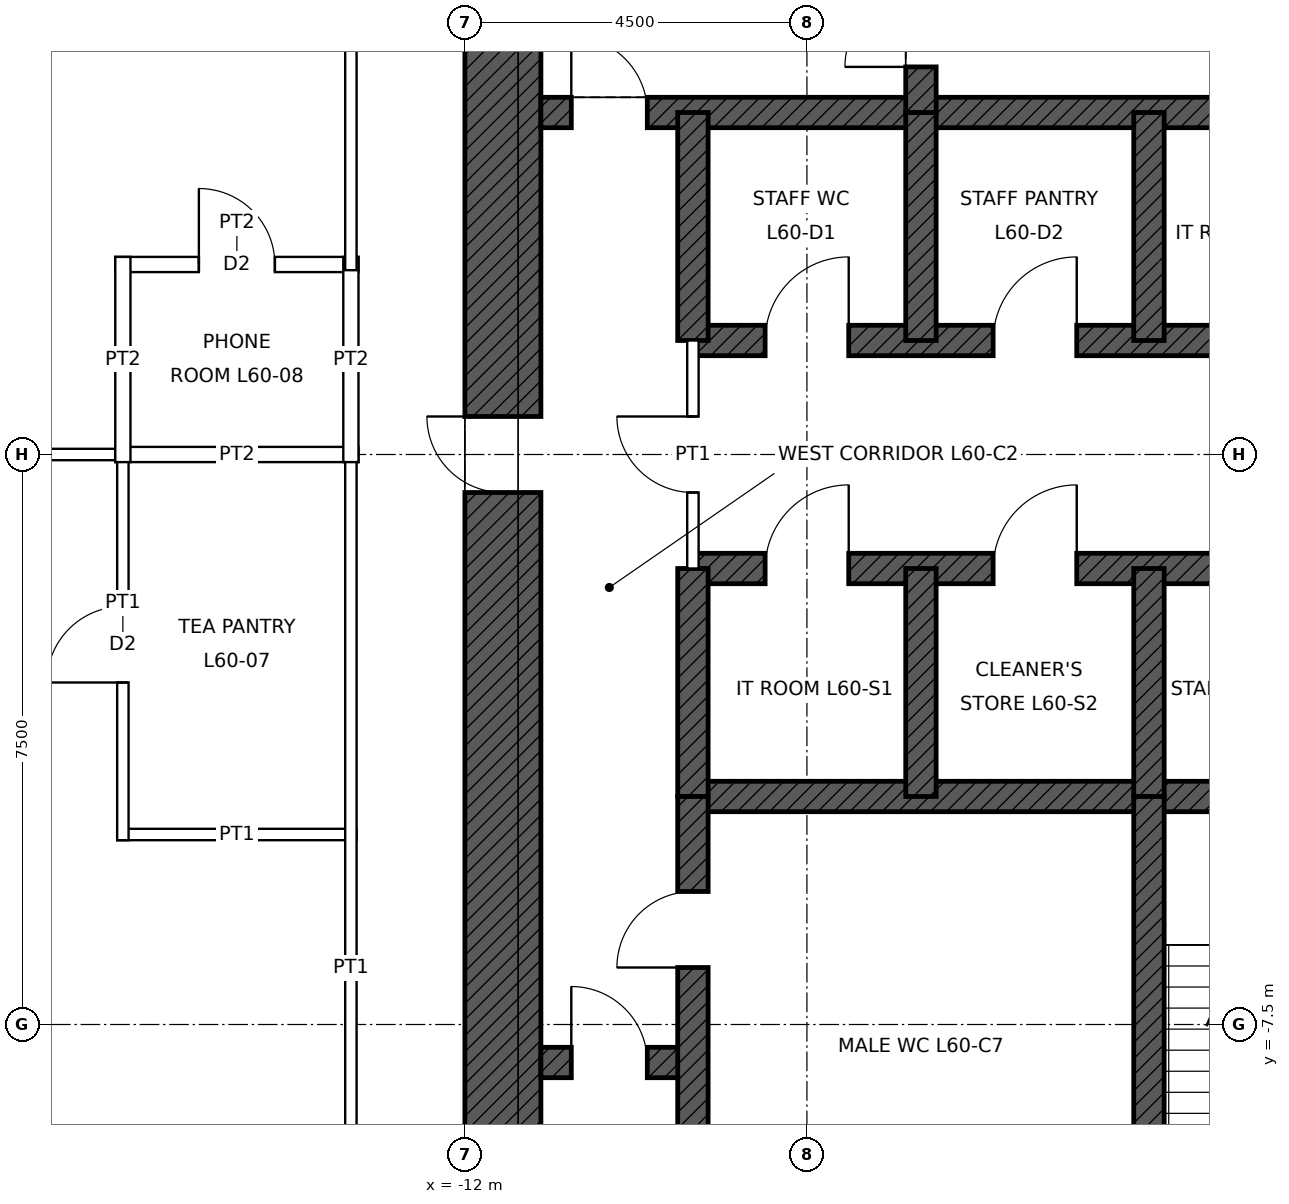
"""IFC4 building model, lengths in metres.
Left out: names, types, materials, properties, quantities, classifications, styles, units other than length and angle.
Written with IfcOpenShell. Run it as: python <this file> out.ifc"""

import sys

from ifc_helpers import new_model, si_unit, direction, frame, frame_2d, origin, place, context, subcontext, project, spatial, rectangle, extrude, element, fill, save


model = new_model("IFC4")
c1 = context("Model", 3, precision=1e-05, world=origin(), true_north=direction((0.0, 1.0)))
c2 = subcontext(c1, "Body", "Model", "MODEL_VIEW")
j1 = project(units=[si_unit("LENGTHUNIT", "METRE"), si_unit("PLANEANGLEUNIT", "RADIAN")], contexts=[c1])
p1 = place(None, origin())
s1 = spatial("IfcSite", under=j1, at=p1, CompositionType="ELEMENT")
p2 = place(p1, origin())
s2 = spatial("IfcBuilding", under=s1, at=p2, CompositionType="ELEMENT")
p3 = place(p2, frame((0.0, 0.0, 275.9)))
s3 = spatial("IfcBuildingStorey", under=s2, at=p3, CompositionType="ELEMENT", Elevation=275.9)
p4 = place(p3, frame((-11.5, -11.0, 0.0), z_axis=(0.0, 0.0, 1.0), x_axis=(0.0, 1.0, 0.0)))
e1 = element("IfcWall", 1, at=p4, inside=s3, PredefinedType="SHEAR", context=c2, shape_type="SweptSolid", body=[
    extrude(rectangle(XDim=22.0, YDim=1.0, at=frame_2d((11.0, 0.0))), origin(), (0.0, 0.0, 1.0), 4.0),
])
p5 = place(p4, frame((10.5, 0.0, 0.0)))
e2 = element("IfcOpeningElement", 2, at=p5, cuts=e1, PredefinedType="OPENING", context=c2, shape_type="SweptSolid", body=[
    extrude(rectangle(XDim=1.0, YDim=2.4, at=frame_2d((0.5, 1.2))), frame((0.0, 0.51, 0.0), z_axis=(0.0, -1.0, 0.0), x_axis=(1.0, 0.0, 0.0)), (0.0, 0.0, 1.0), 1.02),
])
p6 = place(p3, frame((-11.0, 4.5, 0.0), z_axis=(0.0, 0.0, 1.0), x_axis=(1.0, 0.0, 0.0)))
e3 = element("IfcWall", 3, at=p6, inside=s3, PredefinedType="SHEAR", context=c2, shape_type="SweptSolid", body=[
    extrude(rectangle(XDim=22.0, YDim=0.4, at=frame_2d((11.0, 0.0))), origin(), (0.0, 0.0, 1.0), 4.0),
])
p7 = place(p6, frame((0.4, 0.0, 0.0)))
e4 = element("IfcOpeningElement", 4, at=p7, cuts=e3, PredefinedType="OPENING", context=c2, shape_type="SweptSolid", body=[
    extrude(rectangle(XDim=1.0, YDim=2.1, at=frame_2d((0.5, 1.05))), frame((0.0, 0.21, 0.0), z_axis=(0.0, -1.0, 0.0), x_axis=(1.0, 0.0, 0.0)), (0.0, 0.0, 1.0), 0.42),
])
p8 = place(p6, frame((20.6, 0.0, 0.0)))
e5 = element("IfcOpeningElement", 5, at=p8, cuts=e3, PredefinedType="OPENING", context=c2, shape_type="SweptSolid", body=[
    extrude(rectangle(XDim=1.0, YDim=2.1, at=frame_2d((0.5, 1.05))), frame((0.0, 0.21, 0.0), z_axis=(0.0, -1.0, 0.0), x_axis=(1.0, 0.0, 0.0)), (0.0, 0.0, 1.0), 0.42),
])
p9 = place(p3, frame((-9.0, 1.5, 0.0), z_axis=(0.0, 0.0, 1.0), x_axis=(1.0, 0.0, 0.0)))
e6 = element("IfcWall", 6, at=p9, inside=s3, PredefinedType="SHEAR", context=c2, shape_type="SweptSolid", body=[
    extrude(rectangle(XDim=18.0, YDim=0.4, at=frame_2d((9.0, 0.0))), origin(), (0.0, 0.0, 1.0), 4.0),
])
p10 = place(p9, frame((0.95, 0.0, 0.0)))
e7 = element("IfcOpeningElement", 7, at=p10, cuts=e6, PredefinedType="OPENING", context=c2, shape_type="SweptSolid", body=[
    extrude(rectangle(XDim=1.1, YDim=2.1, at=frame_2d((0.55, 1.05))), frame((0.0, 0.21, 0.0), z_axis=(0.0, -1.0, 0.0), x_axis=(1.0, 0.0, 0.0)), (0.0, 0.0, 1.0), 0.42),
])
p11 = place(p9, frame((3.95, 0.0, 0.0)))
e8 = element("IfcOpeningElement", 8, at=p11, cuts=e6, PredefinedType="OPENING", context=c2, shape_type="SweptSolid", body=[
    extrude(rectangle(XDim=1.1, YDim=2.1, at=frame_2d((0.55, 1.05))), frame((0.0, 0.21, 0.0), z_axis=(0.0, -1.0, 0.0), x_axis=(1.0, 0.0, 0.0)), (0.0, 0.0, 1.0), 0.42),
])
p12 = place(p9, frame((6.95, 0.0, 0.0)))
e9 = element("IfcOpeningElement", 9, at=p12, cuts=e6, PredefinedType="OPENING", context=c2, shape_type="SweptSolid", body=[
    extrude(rectangle(XDim=1.1, YDim=2.1, at=frame_2d((0.55, 1.05))), frame((0.0, 0.21, 0.0), z_axis=(0.0, -1.0, 0.0), x_axis=(1.0, 0.0, 0.0)), (0.0, 0.0, 1.0), 0.42),
])
p13 = place(p9, frame((9.95, 0.0, 0.0)))
e10 = element("IfcOpeningElement", 10, at=p13, cuts=e6, PredefinedType="OPENING", context=c2, shape_type="SweptSolid", body=[
    extrude(rectangle(XDim=1.1, YDim=2.1, at=frame_2d((0.55, 1.05))), frame((0.0, 0.21, 0.0), z_axis=(0.0, -1.0, 0.0), x_axis=(1.0, 0.0, 0.0)), (0.0, 0.0, 1.0), 0.42),
])
p14 = place(p9, frame((12.95, 0.0, 0.0)))
e11 = element("IfcOpeningElement", 11, at=p14, cuts=e6, PredefinedType="OPENING", context=c2, shape_type="SweptSolid", body=[
    extrude(rectangle(XDim=1.1, YDim=2.1, at=frame_2d((0.55, 1.05))), frame((0.0, 0.21, 0.0), z_axis=(0.0, -1.0, 0.0), x_axis=(1.0, 0.0, 0.0)), (0.0, 0.0, 1.0), 0.42),
])
p15 = place(p9, frame((15.95, 0.0, 0.0)))
e12 = element("IfcOpeningElement", 12, at=p15, cuts=e6, PredefinedType="OPENING", context=c2, shape_type="SweptSolid", body=[
    extrude(rectangle(XDim=1.1, YDim=2.1, at=frame_2d((0.55, 1.05))), frame((0.0, 0.21, 0.0), z_axis=(0.0, -1.0, 0.0), x_axis=(1.0, 0.0, 0.0)), (0.0, 0.0, 1.0), 0.42),
])
p16 = place(p3, frame((-9.0, -1.5, 0.0), z_axis=(0.0, 0.0, 1.0), x_axis=(1.0, 0.0, 0.0)))
e13 = element("IfcWall", 13, at=p16, inside=s3, PredefinedType="SHEAR", context=c2, shape_type="SweptSolid", body=[
    extrude(rectangle(XDim=18.0, YDim=0.4, at=frame_2d((9.0, 0.0))), origin(), (0.0, 0.0, 1.0), 4.0),
])
p17 = place(p16, frame((9.95, 0.0, 0.0)))
e14 = element("IfcOpeningElement", 14, at=p17, cuts=e13, PredefinedType="OPENING", context=c2, shape_type="SweptSolid", body=[
    extrude(rectangle(XDim=1.1, YDim=2.1, at=frame_2d((0.55, 1.05))), frame((0.0, 0.21, 0.0), z_axis=(0.0, -1.0, 0.0), x_axis=(1.0, 0.0, 0.0)), (0.0, 0.0, 1.0), 0.42),
])
p18 = place(p16, frame((12.95, 0.0, 0.0)))
e15 = element("IfcOpeningElement", 15, at=p18, cuts=e13, PredefinedType="OPENING", context=c2, shape_type="SweptSolid", body=[
    extrude(rectangle(XDim=1.1, YDim=2.1, at=frame_2d((0.55, 1.05))), frame((0.0, 0.21, 0.0), z_axis=(0.0, -1.0, 0.0), x_axis=(1.0, 0.0, 0.0)), (0.0, 0.0, 1.0), 0.42),
])
p19 = place(p16, frame((15.95, 0.0, 0.0)))
e16 = element("IfcOpeningElement", 16, at=p19, cuts=e13, PredefinedType="OPENING", context=c2, shape_type="SweptSolid", body=[
    extrude(rectangle(XDim=1.1, YDim=2.1, at=frame_2d((0.55, 1.05))), frame((0.0, 0.21, 0.0), z_axis=(0.0, -1.0, 0.0), x_axis=(1.0, 0.0, 0.0)), (0.0, 0.0, 1.0), 0.42),
])
p20 = place(p16, frame((0.95, 0.0, 0.0)))
e17 = element("IfcOpeningElement", 17, at=p20, cuts=e13, PredefinedType="OPENING", context=c2, shape_type="SweptSolid", body=[
    extrude(rectangle(XDim=1.1, YDim=2.1, at=frame_2d((0.55, 1.05))), frame((0.0, 0.21, 0.0), z_axis=(0.0, -1.0, 0.0), x_axis=(1.0, 0.0, 0.0)), (0.0, 0.0, 1.0), 0.42),
])
p21 = place(p16, frame((3.95, 0.0, 0.0)))
e18 = element("IfcOpeningElement", 18, at=p21, cuts=e13, PredefinedType="OPENING", context=c2, shape_type="SweptSolid", body=[
    extrude(rectangle(XDim=1.1, YDim=2.1, at=frame_2d((0.55, 1.05))), frame((0.0, 0.21, 0.0), z_axis=(0.0, -1.0, 0.0), x_axis=(1.0, 0.0, 0.0)), (0.0, 0.0, 1.0), 0.42),
])
p22 = place(p16, frame((6.95, 0.0, 0.0)))
e19 = element("IfcOpeningElement", 19, at=p22, cuts=e13, PredefinedType="OPENING", context=c2, shape_type="SweptSolid", body=[
    extrude(rectangle(XDim=1.1, YDim=2.1, at=frame_2d((0.55, 1.05))), frame((0.0, 0.21, 0.0), z_axis=(0.0, -1.0, 0.0), x_axis=(1.0, 0.0, 0.0)), (0.0, 0.0, 1.0), 0.42),
])
p23 = place(p3, frame((-9.0, -4.5, 0.0), z_axis=(0.0, 0.0, 1.0), x_axis=(1.0, 0.0, 0.0)))
e20 = element("IfcWall", 20, at=p23, inside=s3, PredefinedType="SHEAR", context=c2, shape_type="SweptSolid", body=[
    extrude(rectangle(XDim=18.0, YDim=0.4, at=frame_2d((9.0, 0.0))), origin(), (0.0, 0.0, 1.0), 4.0),
])
p24 = place(p3, frame((-11.0, -8.0, 0.0), z_axis=(0.0, 0.0, 1.0), x_axis=(1.0, 0.0, 0.0)))
e21 = element("IfcWall", 21, at=p24, inside=s3, PredefinedType="SHEAR", context=c2, shape_type="SweptSolid", body=[
    extrude(rectangle(XDim=2.0, YDim=0.4, at=frame_2d((1.0, 0.0))), origin(), (0.0, 0.0, 1.0), 4.0),
])
p25 = place(p24, frame((0.4, 0.0, 0.0)))
e22 = element("IfcOpeningElement", 22, at=p25, cuts=e21, PredefinedType="OPENING", context=c2, shape_type="SweptSolid", body=[
    extrude(rectangle(XDim=1.0, YDim=2.1, at=frame_2d((0.5, 1.05))), frame((0.0, 0.21, 0.0), z_axis=(0.0, -1.0, 0.0), x_axis=(1.0, 0.0, 0.0)), (0.0, 0.0, 1.0), 0.42),
])
for number, where, z_axis, x_axis in (
    (23, (-9.0, 1.5, 0.0), (0.0, 0.0, 1.0), (0.0, 1.0, 0.0)),
    (24, (-9.0, -4.5, 0.0), (0.0, 0.0, 1.0), (0.0, 1.0, 0.0)),
    (25, (-6.0, 1.5, 0.0), (0.0, 0.0, 1.0), (0.0, 1.0, 0.0)),
    (26, (-3.0, 1.5, 0.0), (0.0, 0.0, 1.0), (0.0, 1.0, 0.0)),
    (27, (-6.0, -4.5, 0.0), (0.0, 0.0, 1.0), (0.0, 1.0, 0.0)),
    (28, (-3.0, -4.5, 0.0), (0.0, 0.0, 1.0), (0.0, 1.0, 0.0)),
):
    element("IfcWall", number, at=place(p3, frame(where, z_axis=z_axis, x_axis=x_axis)), inside=s3, PredefinedType="SHEAR", context=c2, shape_type="SweptSolid", body=[
        extrude(rectangle(XDim=3.0, YDim=0.4, at=frame_2d((1.5, 0.0))), origin(), (0.0, 0.0, 1.0), 4.0),
    ])
p26 = place(p3, frame((-6.0, 4.5, 0.0), z_axis=(0.0, 0.0, 1.0), x_axis=(0.0, 1.0, 0.0)))
e29 = element("IfcWall", 29, at=p26, inside=s3, PredefinedType="SHEAR", context=c2, shape_type="SweptSolid", body=[
    extrude(rectangle(XDim=6.5, YDim=0.4, at=frame_2d((3.25, 0.0))), origin(), (0.0, 0.0, 1.0), 4.0),
])
p27 = place(p26, frame((0.6, 0.0, 0.0)))
e30 = element("IfcOpeningElement", 30, at=p27, cuts=e29, PredefinedType="OPENING", context=c2, shape_type="SweptSolid", body=[
    extrude(rectangle(XDim=1.0, YDim=2.1, at=frame_2d((0.5, 1.05))), frame((0.0, 0.21, 0.0), z_axis=(0.0, -1.0, 0.0), x_axis=(1.0, 0.0, 0.0)), (0.0, 0.0, 1.0), 0.42),
])
p28 = place(p3, frame((-9.0, -11.0, 0.0), z_axis=(0.0, 0.0, 1.0), x_axis=(0.0, 1.0, 0.0)))
e31 = element("IfcWall", 31, at=p28, inside=s3, PredefinedType="SHEAR", context=c2, shape_type="SweptSolid", body=[
    extrude(rectangle(XDim=6.5, YDim=0.4, at=frame_2d((3.25, 0.0))), origin(), (0.0, 0.0, 1.0), 4.0),
])
p29 = place(p28, frame((4.25, 0.0, 0.0)))
e32 = element("IfcOpeningElement", 32, at=p29, cuts=e31, PredefinedType="OPENING", context=c2, shape_type="SweptSolid", body=[
    extrude(rectangle(XDim=1.0, YDim=2.1, at=frame_2d((0.5, 1.05))), frame((0.0, 0.21, 0.0), z_axis=(0.0, -1.0, 0.0), x_axis=(1.0, 0.0, 0.0)), (0.0, 0.0, 1.0), 0.42),
])
p30 = place(p3, frame((-3.0, -11.0, 0.0), z_axis=(0.0, 0.0, 1.0), x_axis=(0.0, 1.0, 0.0)))
e33 = element("IfcWall", 33, at=p30, inside=s3, PredefinedType="SHEAR", context=c2, shape_type="SweptSolid", body=[
    extrude(rectangle(XDim=6.5, YDim=0.4, at=frame_2d((3.25, 0.0))), origin(), (0.0, 0.0, 1.0), 4.0),
])
p31 = place(p3, frame((-16.575, -5.0, 0.0), z_axis=(0.0, 0.0, 1.0), x_axis=(1.0, 0.0, 0.0)))
e34 = element("IfcWall", 34, at=p31, inside=s3, PredefinedType="PARTITIONING", context=c2, shape_type="SweptSolid", body=[
    extrude(rectangle(XDim=3.15, YDim=0.15, at=frame_2d((1.575, 0.0))), origin(), (0.0, 0.0, 1.0), 3.85),
])
p32 = place(p3, frame((-19.54, 0.0, 0.0), z_axis=(0.0, 0.0, 1.0), x_axis=(1.0, 0.0, 0.0)))
e35 = element("IfcWall", 35, at=p32, inside=s3, PredefinedType="PARTITIONING", context=c2, shape_type="SweptSolid", body=[
    extrude(rectangle(XDim=3.115, YDim=0.15, at=frame_2d((1.558, 0.0))), origin(), (0.0, 0.0, 1.0), 3.243),
])
p33 = place(p3, frame((-16.6, 0.0, 0.0), z_axis=(0.0, 0.0, 1.0), x_axis=(1.0, 0.0, 0.0)))
e36 = element("IfcWall", 36, at=p33, inside=s3, PredefinedType="PARTITIONING", context=c2, shape_type="SweptSolid", body=[
    extrude(rectangle(XDim=3.2, YDim=0.2, at=frame_2d((1.6, 0.0))), origin(), (0.0, 0.0, 1.0), 3.243),
])
p34 = place(p3, frame((-16.6, 2.5, 0.0), z_axis=(0.0, 0.0, 1.0), x_axis=(1.0, 0.0, 0.0)))
e37 = element("IfcWall", 37, at=p34, inside=s3, PredefinedType="PARTITIONING", context=c2, shape_type="SweptSolid", body=[
    extrude(rectangle(XDim=3.2, YDim=0.2, at=frame_2d((1.6, 0.0))), origin(), (0.0, 0.0, 1.0), 3.85),
])
p35 = place(p34, frame((1.1, 0.0, 0.0)))
e38 = element("IfcOpeningElement", 38, at=p35, cuts=e37, PredefinedType="OPENING", context=c2, shape_type="SweptSolid", body=[
    extrude(rectangle(XDim=1.0, YDim=2.1, at=frame_2d((0.5, 1.05))), frame((0.0, 0.11, 0.0), z_axis=(0.0, -1.0, 0.0), x_axis=(1.0, 0.0, 0.0)), (0.0, 0.0, 1.0), 0.22),
])
p36 = place(p3, frame((-16.5, -5.075, 0.0), z_axis=(0.0, 0.0, 1.0), x_axis=(0.0, 1.0, 0.0)))
e39 = element("IfcWall", 39, at=p36, inside=s3, PredefinedType="PARTITIONING", context=c2, shape_type="SweptSolid", body=[
    extrude(rectangle(XDim=5.15, YDim=0.15, at=frame_2d((2.575, 0.0))), origin(), (0.0, 0.0, 1.0), 3.85),
])
p37 = place(p36, frame((2.075, 0.0, 0.0)))
e40 = element("IfcOpeningElement", 40, at=p37, cuts=e39, PredefinedType="OPENING", context=c2, shape_type="SweptSolid", body=[
    extrude(rectangle(XDim=1.0, YDim=2.1, at=frame_2d((0.5, 1.05))), frame((0.0, 0.085, 0.0), z_axis=(0.0, -1.0, 0.0), x_axis=(1.0, 0.0, 0.0)), (0.0, 0.0, 1.0), 0.17),
])
p38 = place(p3, frame((-16.5, -0.1, 0.0), z_axis=(0.0, 0.0, 1.0), x_axis=(0.0, 1.0, 0.0)))
e41 = element("IfcWall", 41, at=p38, inside=s3, PredefinedType="PARTITIONING", context=c2, shape_type="SweptSolid", body=[
    extrude(rectangle(XDim=2.7, YDim=0.2, at=frame_2d((1.35, 0.0))), origin(), (0.0, 0.0, 1.0), 3.85),
])
p39 = place(p3, frame((-13.5, -13.575, 0.0), z_axis=(0.0, 0.0, 1.0), x_axis=(0.0, 1.0, 0.0)))
e42 = element("IfcWall", 42, at=p39, inside=s3, PredefinedType="PARTITIONING", context=c2, shape_type="SweptSolid", body=[
    extrude(rectangle(XDim=13.65, YDim=0.15, at=frame_2d((6.825, 0.0))), origin(), (0.0, 0.0, 1.0), 3.85),
])
p40 = place(p3, frame((-13.5, -0.1, 0.0), z_axis=(0.0, 0.0, 1.0), x_axis=(0.0, 1.0, 0.0)))
e43 = element("IfcWall", 43, at=p40, inside=s3, PredefinedType="PARTITIONING", context=c2, shape_type="SweptSolid", body=[
    extrude(rectangle(XDim=2.7, YDim=0.2, at=frame_2d((1.35, 0.0))), origin(), (0.0, 0.0, 1.0), 3.85),
])
p41 = place(p3, frame((-13.5, 2.425, 0.0), z_axis=(0.0, 0.0, 1.0), x_axis=(0.0, 1.0, 0.0)))
e44 = element("IfcWall", 44, at=p41, inside=s3, PredefinedType="PARTITIONING", context=c2, shape_type="SweptSolid", body=[
    extrude(rectangle(XDim=11.15, YDim=0.15, at=frame_2d((5.575, 0.0))), origin(), (0.0, 0.0, 1.0), 3.85),
])
p42 = place(p41, frame((5.075, 0.0, 0.0)))
e45 = element("IfcOpeningElement", 45, at=p42, cuts=e44, PredefinedType="OPENING", context=c2, shape_type="SweptSolid", body=[
    extrude(rectangle(XDim=1.0, YDim=2.4, at=frame_2d((0.5, 1.2))), frame((0.0, 0.085, 0.0), z_axis=(0.0, -1.0, 0.0), x_axis=(1.0, 0.0, 0.0)), (0.0, 0.0, 1.0), 0.17),
])
p43 = place(p3, frame((-9.0, -1.5, 0.0), z_axis=(0.0, 0.0, 1.0), x_axis=(0.0, 1.0, 0.0)))
e46 = element("IfcWall", 46, at=p43, inside=s3, PredefinedType="PARTITIONING", context=c2, shape_type="SweptSolid", body=[
    extrude(rectangle(XDim=3.0, YDim=0.15, at=frame_2d((1.5, 0.0))), origin(), (0.0, 0.0, 1.0), 3.75),
])
p44 = place(p43, frame((1.0, 0.0, 0.0)))
e47 = element("IfcOpeningElement", 47, at=p44, cuts=e46, PredefinedType="OPENING", context=c2, shape_type="SweptSolid", body=[
    extrude(rectangle(XDim=1.0, YDim=2.4, at=frame_2d((0.5, 1.2))), frame((0.0, 0.085, 0.0), z_axis=(0.0, -1.0, 0.0), x_axis=(1.0, 0.0, 0.0)), (0.0, 0.0, 1.0), 0.17),
])
p45 = place(p7, origin())
e48 = element("IfcDoor", 48, at=p45, inside=s3, OperationType="SINGLE_SWING_LEFT", PredefinedType="DOOR", context=c2, shape_type="SweptSolid", body=[
    extrude(rectangle(XDim=1.0, YDim=2.1, at=frame_2d((0.5, 1.05))), frame((0.0, 0.025, 0.0), z_axis=(0.0, -1.0, 0.0), x_axis=(1.0, 0.0, 0.0)), (0.0, 0.0, 1.0), 0.05),
])
fill(e4, e48)
p46 = place(p27, origin())
e49 = element("IfcDoor", 49, at=p46, inside=s3, OperationType="SINGLE_SWING_LEFT", PredefinedType="DOOR", context=c2, shape_type="SweptSolid", body=[
    extrude(rectangle(XDim=1.0, YDim=2.1, at=frame_2d((0.5, 1.05))), frame((0.0, 0.025, 0.0), z_axis=(0.0, -1.0, 0.0), x_axis=(1.0, 0.0, 0.0)), (0.0, 0.0, 1.0), 0.05),
])
fill(e30, e49)
p47 = place(p5, origin())
e50 = element("IfcDoor", 50, at=p47, inside=s3, OperationType="SINGLE_SWING_RIGHT", PredefinedType="DOOR", context=c2, shape_type="SweptSolid", body=[
    extrude(rectangle(XDim=1.0, YDim=2.4, at=frame_2d((0.5, 1.2))), frame((0.0, 0.485, 0.0), z_axis=(0.0, -1.0, 0.0), x_axis=(1.0, 0.0, 0.0)), (0.0, 0.0, 1.0), 0.05),
])
fill(e2, e50)
p48 = place(p29, origin())
e51 = element("IfcDoor", 51, at=p48, inside=s3, OperationType="SINGLE_SWING_LEFT", PredefinedType="DOOR", context=c2, shape_type="SweptSolid", body=[
    extrude(rectangle(XDim=1.0, YDim=2.1, at=frame_2d((0.5, 1.05))), frame((0.0, 0.025, 0.0), z_axis=(0.0, -1.0, 0.0), x_axis=(1.0, 0.0, 0.0)), (0.0, 0.0, 1.0), 0.05),
])
fill(e32, e51)
p49 = place(p25, origin())
e52 = element("IfcDoor", 52, at=p49, inside=s3, OperationType="SINGLE_SWING_LEFT", PredefinedType="DOOR", context=c2, shape_type="SweptSolid", body=[
    extrude(rectangle(XDim=1.0, YDim=2.1, at=frame_2d((0.5, 1.05))), frame((0.0, 0.025, 0.0), z_axis=(0.0, -1.0, 0.0), x_axis=(1.0, 0.0, 0.0)), (0.0, 0.0, 1.0), 0.05),
])
fill(e22, e52)
p50 = place(p44, origin())
e53 = element("IfcDoor", 53, at=p50, inside=s3, OperationType="SINGLE_SWING_RIGHT", PredefinedType="DOOR", context=c2, shape_type="SweptSolid", body=[
    extrude(rectangle(XDim=1.0, YDim=2.4, at=frame_2d((0.5, 1.2))), frame((0.0, 0.025, 0.0), z_axis=(0.0, -1.0, 0.0), x_axis=(1.0, 0.0, 0.0)), (0.0, 0.0, 1.0), 0.05),
])
fill(e47, e53)
p51 = place(p10, origin())
e54 = element("IfcDoor", 54, at=p51, inside=s3, OperationType="SINGLE_SWING_RIGHT", PredefinedType="DOOR", context=c2, shape_type="SweptSolid", body=[
    extrude(rectangle(XDim=1.1, YDim=2.1, at=frame_2d((0.55, 1.05))), frame((0.0, 0.025, 0.0), z_axis=(0.0, -1.0, 0.0), x_axis=(1.0, 0.0, 0.0)), (0.0, 0.0, 1.0), 0.05),
])
fill(e7, e54)
p52 = place(p11, origin())
e55 = element("IfcDoor", 55, at=p52, inside=s3, OperationType="SINGLE_SWING_RIGHT", PredefinedType="DOOR", context=c2, shape_type="SweptSolid", body=[
    extrude(rectangle(XDim=1.1, YDim=2.1, at=frame_2d((0.55, 1.05))), frame((0.0, 0.025, 0.0), z_axis=(0.0, -1.0, 0.0), x_axis=(1.0, 0.0, 0.0)), (0.0, 0.0, 1.0), 0.05),
])
fill(e8, e55)
p53 = place(p20, origin())
e56 = element("IfcDoor", 56, at=p53, inside=s3, OperationType="SINGLE_SWING_RIGHT", PredefinedType="DOOR", context=c2, shape_type="SweptSolid", body=[
    extrude(rectangle(XDim=1.1, YDim=2.1, at=frame_2d((0.55, 1.05))), frame((0.0, 0.025, 0.0), z_axis=(0.0, -1.0, 0.0), x_axis=(1.0, 0.0, 0.0)), (0.0, 0.0, 1.0), 0.05),
])
fill(e17, e56)
p54 = place(p21, origin())
e57 = element("IfcDoor", 57, at=p54, inside=s3, OperationType="SINGLE_SWING_RIGHT", PredefinedType="DOOR", context=c2, shape_type="SweptSolid", body=[
    extrude(rectangle(XDim=1.1, YDim=2.1, at=frame_2d((0.55, 1.05))), frame((0.0, 0.025, 0.0), z_axis=(0.0, -1.0, 0.0), x_axis=(1.0, 0.0, 0.0)), (0.0, 0.0, 1.0), 0.05),
])
fill(e18, e57)
p55 = place(p37, origin())
e58 = element("IfcDoor", 58, at=p55, inside=s3, OperationType="SINGLE_SWING_LEFT", PredefinedType="DOOR", context=c2, shape_type="SweptSolid", body=[
    extrude(rectangle(XDim=1.0, YDim=2.1, at=frame_2d((0.5, 1.05))), frame((0.0, 0.025, 0.0), z_axis=(0.0, -1.0, 0.0), x_axis=(1.0, 0.0, 0.0)), (0.0, 0.0, 1.0), 0.05),
])
fill(e40, e58)
p56 = place(p35, origin())
e59 = element("IfcDoor", 59, at=p56, inside=s3, OperationType="SINGLE_SWING_LEFT", PredefinedType="DOOR", context=c2, shape_type="SweptSolid", body=[
    extrude(rectangle(XDim=1.0, YDim=2.1, at=frame_2d((0.5, 1.05))), frame((0.0, 0.025, 0.0), z_axis=(0.0, -1.0, 0.0), x_axis=(1.0, 0.0, 0.0)), (0.0, 0.0, 1.0), 0.05),
])
fill(e38, e59)
save(model, sys.argv[1])
